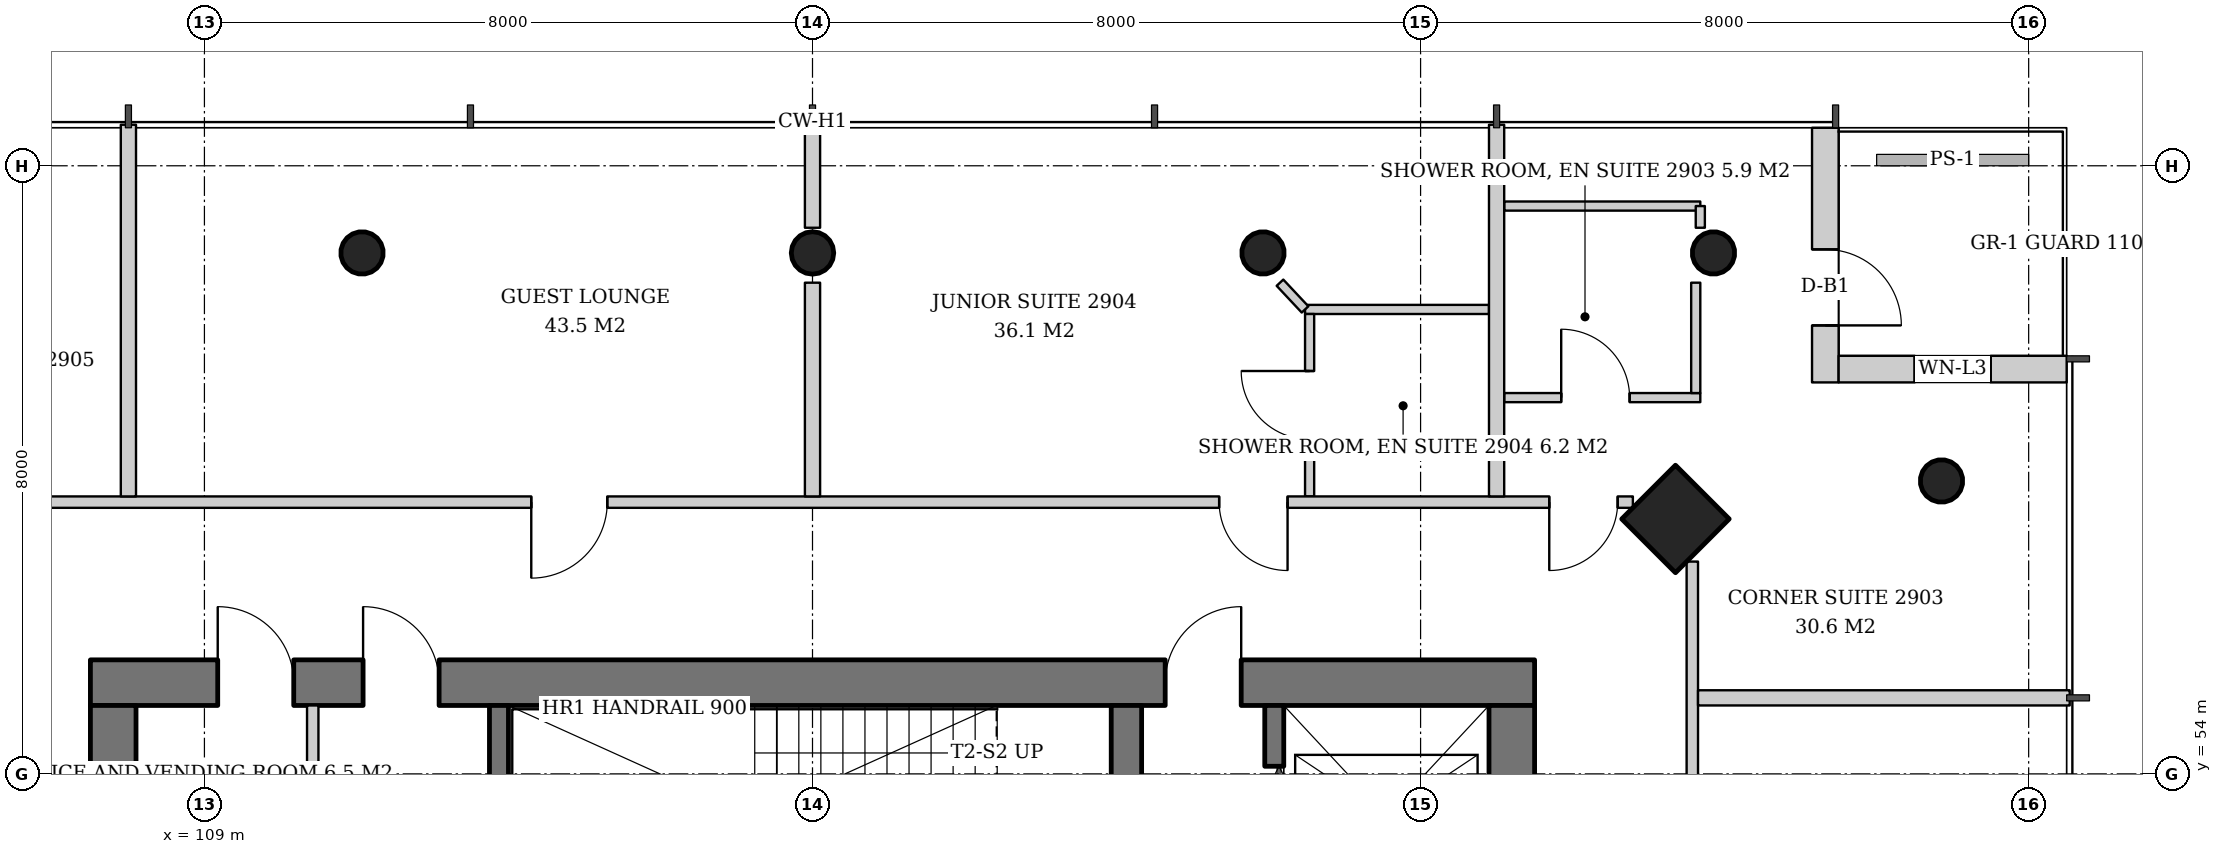
"""IFC4 building model, lengths in metres.
Left out: names, types, materials, properties, quantities, classifications, styles, units other than length and angle.
Written with IfcOpenShell. Run it as: python <this file> out.ifc"""

import sys

from ifc_helpers import new_model, si_unit, direction, frame, frame_2d, origin, origin_2d, place, context, subcontext, project, spatial, rectangle, hollow_circle, extrude, element, fill, save


model = new_model("IFC4")
c1 = context("Model", 3, precision=1e-05, world=origin(), true_north=direction((0.0, 1.0)))
c2 = subcontext(c1, "Body", "Model", "MODEL_VIEW")
j1 = project(units=[si_unit("LENGTHUNIT", "METRE"), si_unit("PLANEANGLEUNIT", "RADIAN")], contexts=[c1])
p1 = place(None, origin())
s1 = spatial("IfcSite", under=j1, at=p1, CompositionType="ELEMENT")
p2 = place(p1, origin())
s2 = spatial("IfcBuilding", under=s1, at=p2, CompositionType="ELEMENT")
p3 = place(p2, frame((0.0, 0.0, 116.0)))
s3 = spatial("IfcBuildingStorey", under=s2, at=p3, CompositionType="ELEMENT", Elevation=116.0)
p4 = place(p3, frame((128.405, 57.405, 0.0), z_axis=(-0.043029647111, -0.043029647111, 0.998146732169), x_axis=(0.707106781187, -0.707106781187, 0.0)))
e1 = element("IfcColumn", 1, at=p4, inside=s3, PredefinedType="COLUMN", context=c2, shape_type="SweptSolid", body=[
    extrude(rectangle(XDim=1.0, YDim=1.0, at=origin_2d()), origin(), (0.0, 0.0, 1.0), 3.807),
])
for number, where, z_axis, x_axis in (
    (2, (131.905, 57.905, 0.0), (-0.043, -0.043, 0.998), (0.707, -0.707, 0.0)),
    (3, (128.905, 60.905, 0.0), (-0.043, -0.043, 0.998), (0.707, -0.707, 0.0)),
):
    element("IfcColumn", number, at=place(p3, frame(where, z_axis=z_axis, x_axis=x_axis)), inside=s3, PredefinedType="COLUMN", context=c2, shape_type="SweptSolid", body=[
        extrude(hollow_circle(Radius=0.28, WallThickness=0.02, at=origin_2d()), origin(), (0.0, 0.0, 1.0), 3.807),
    ])
p5 = place(p3, frame((122.953, 60.905, 0.0), z_axis=(-0.021561848751, -0.043059525333, 0.998839808957), x_axis=(0.894160516368, -0.44774654769, 0.0)))
e4 = element("IfcColumn", 4, at=p5, inside=s3, PredefinedType="COLUMN", context=c2, shape_type="SweptSolid", body=[
    extrude(hollow_circle(Radius=0.28, WallThickness=0.02, at=origin_2d()), origin(), (0.0, 0.0, 1.0), 3.804),
])
p6 = place(p3, frame((117.0, 60.905, 0.0), z_axis=(0.0, -0.043069538298, 0.999072076915), x_axis=(1.0, 0.0, 0.0)))
e5 = element("IfcColumn", 5, at=p6, inside=s3, PredefinedType="COLUMN", context=c2, shape_type="SweptSolid", body=[
    extrude(hollow_circle(Radius=0.28, WallThickness=0.02, at=origin_2d()), origin(), (0.0, 0.0, 1.0), 3.803),
])
p7 = place(p3, frame((111.047, 60.905, 0.0), z_axis=(0.021561848751, -0.043059525333, 0.998839808957), x_axis=(0.894160516368, 0.44774654769, 0.0)))
e6 = element("IfcColumn", 6, at=p7, inside=s3, PredefinedType="COLUMN", context=c2, shape_type="SweptSolid", body=[
    extrude(hollow_circle(Radius=0.28, WallThickness=0.02, at=origin_2d()), origin(), (0.0, 0.0, 1.0), 3.804),
])
p8 = place(p3, frame((107.5, 55.2, 0.0), z_axis=(0.0, 0.0, 1.0), x_axis=(1.0, 0.0, 0.0)))
e7 = element("IfcWall", 7, at=p8, inside=s3, PredefinedType="SHEAR", context=c2, shape_type="SweptSolid", body=[
    extrude(rectangle(XDim=19.0, YDim=0.6, at=frame_2d((9.5, 0.0))), origin(), (0.0, 0.0, 1.0), 3.8),
])
p9 = place(p8, frame((14.14, 0.0, 0.0)))
e8 = element("IfcOpeningElement", 8, at=p9, cuts=e7, PredefinedType="OPENING", context=c2, shape_type="SweptSolid", body=[
    extrude(rectangle(XDim=1.0, YDim=2.1, at=frame_2d((0.5, 1.05))), frame((0.0, 0.31, 0.0), z_axis=(0.0, -1.0, 0.0), x_axis=(1.0, 0.0, 0.0)), (0.0, 0.0, 1.0), 0.62),
])
p10 = place(p8, frame((1.675, 0.0, 0.0)))
e9 = element("IfcOpeningElement", 9, at=p10, cuts=e7, PredefinedType="OPENING", context=c2, shape_type="SweptSolid", body=[
    extrude(rectangle(XDim=1.0, YDim=2.1, at=frame_2d((0.5, 1.05))), frame((0.0, 0.31, 0.0), z_axis=(0.0, -1.0, 0.0), x_axis=(1.0, 0.0, 0.0)), (0.0, 0.0, 1.0), 0.62),
])
p11 = place(p8, frame((3.587, 0.0, 0.0)))
e10 = element("IfcOpeningElement", 10, at=p11, cuts=e7, PredefinedType="OPENING", context=c2, shape_type="SweptSolid", body=[
    extrude(rectangle(XDim=1.0, YDim=2.1, at=frame_2d((0.5, 1.05))), frame((0.0, 0.31, 0.0), z_axis=(0.0, -1.0, 0.0), x_axis=(1.0, 0.0, 0.0)), (0.0, 0.0, 1.0), 0.62),
])
p12 = place(p3, frame((107.8, 37.1, 0.0), z_axis=(0.0, 0.0, 1.0), x_axis=(0.0, 1.0, 0.0)))
e11 = element("IfcWall", 11, at=p12, inside=s3, PredefinedType="SHEAR", context=c2, shape_type="SweptSolid", body=[
    extrude(rectangle(XDim=17.8, YDim=0.6, at=frame_2d((8.9, 0.0))), origin(), (0.0, 0.0, 1.0), 3.8),
])
p13 = place(p12, frame((8.0, 0.0, 0.0)))
e12 = element("IfcOpeningElement", 12, at=p13, cuts=e11, PredefinedType="OPENING", context=c2, shape_type="SweptSolid", body=[
    extrude(rectangle(XDim=1.8, YDim=2.4, at=frame_2d((0.9, 1.2))), frame((0.0, 0.31, 0.0), z_axis=(0.0, -1.0, 0.0), x_axis=(1.0, 0.0, 0.0)), (0.0, 0.0, 1.0), 0.62),
])
p14 = place(p3, frame((126.2, 37.1, 0.0), z_axis=(0.0, 0.0, 1.0), x_axis=(0.0, 1.0, 0.0)))
e13 = element("IfcWall", 13, at=p14, inside=s3, PredefinedType="SHEAR", context=c2, shape_type="SweptSolid", body=[
    extrude(rectangle(XDim=17.8, YDim=0.6, at=frame_2d((8.9, 0.0))), origin(), (0.0, 0.0, 1.0), 3.8),
])
p15 = place(p14, frame((8.0, 0.0, 0.0)))
e14 = element("IfcOpeningElement", 14, at=p15, cuts=e13, PredefinedType="OPENING", context=c2, shape_type="SweptSolid", body=[
    extrude(rectangle(XDim=1.8, YDim=2.4, at=frame_2d((0.9, 1.2))), frame((0.0, 0.31, 0.0), z_axis=(0.0, -1.0, 0.0), x_axis=(1.0, 0.0, 0.0)), (0.0, 0.0, 1.0), 0.62),
])
p16 = place(p3, frame((121.13, 52.0, 0.0), z_axis=(0.0, 0.0, 1.0), x_axis=(0.0, 1.0, 0.0)))
e15 = element("IfcWall", 15, at=p16, inside=s3, PredefinedType="SHEAR", context=c2, shape_type="SweptSolid", body=[
    extrude(rectangle(XDim=2.9, YDim=0.4, at=frame_2d((1.45, 0.0))), origin(), (0.0, 0.0, 1.0), 3.8),
])
p17 = place(p16, frame((0.3, 0.0, 0.0)))
e16 = element("IfcOpeningElement", 16, at=p17, cuts=e15, PredefinedType="OPENING", context=c2, shape_type="SweptSolid", body=[
    extrude(rectangle(XDim=1.0, YDim=2.1, at=frame_2d((0.5, 1.05))), frame((0.0, 0.21, 0.0), z_axis=(0.0, -1.0, 0.0), x_axis=(1.0, 0.0, 0.0)), (0.0, 0.0, 1.0), 0.42),
])
p18 = place(p3, frame((130.325, 62.5, 0.0), z_axis=(0.0, 0.0, 1.0), x_axis=(0.0, -1.0, 0.0)))
e17 = element("IfcWall", 17, at=p18, inside=s3, PredefinedType="SOLIDWALL", context=c2, shape_type="SweptSolid", body=[
    extrude(rectangle(XDim=3.35, YDim=0.35, at=frame_2d((1.675, 0.0))), origin(), (0.0, 0.0, 1.0), 3.6),
])
p19 = place(p18, frame((1.6, 0.0, 0.0)))
e18 = element("IfcOpeningElement", 18, at=p19, cuts=e17, PredefinedType="OPENING", context=c2, shape_type="SweptSolid", body=[
    extrude(rectangle(XDim=1.0, YDim=2.4, at=frame_2d((0.5, 1.2))), frame((0.0, 0.185, 0.0), z_axis=(0.0, -1.0, 0.0), x_axis=(1.0, 0.0, 0.0)), (0.0, 0.0, 1.0), 0.37),
])
p20 = place(p3, frame((130.5, 59.325, 0.0), z_axis=(0.0, 0.0, 1.0), x_axis=(1.0, 0.0, 0.0)))
e19 = element("IfcWall", 19, at=p20, inside=s3, PredefinedType="SOLIDWALL", context=c2, shape_type="SweptSolid", body=[
    extrude(rectangle(XDim=3.0, YDim=0.35, at=frame_2d((1.5, 0.0))), origin(), (0.0, 0.0, 1.0), 3.6),
])
p21 = place(p20, frame((1.0, 0.0, 0.9)))
e20 = element("IfcOpeningElement", 20, at=p21, cuts=e19, PredefinedType="OPENING", context=c2, shape_type="SweptSolid", body=[
    extrude(rectangle(XDim=1.0, YDim=2.4, at=frame_2d((0.5, 1.2))), frame((0.0, 0.185, 0.0), z_axis=(0.0, -1.0, 0.0), x_axis=(1.0, 0.0, 0.0)), (0.0, 0.0, 1.0), 0.37),
])
p22 = place(p3, frame((112.875, 52.0, 0.0), z_axis=(0.0, 0.0, 1.0), x_axis=(0.0, 1.0, 0.0)))
e21 = element("IfcWall", 21, at=p22, inside=s3, PredefinedType="SHEAR", context=c2, shape_type="SweptSolid", body=[
    extrude(rectangle(XDim=2.9, YDim=0.25, at=frame_2d((1.45, 0.0))), origin(), (0.0, 0.0, 1.0), 3.8),
])
p23 = place(p3, frame((123.075, 52.0, 0.0), z_axis=(0.0, 0.0, 1.0), x_axis=(0.0, 1.0, 0.0)))
e22 = element("IfcWall", 22, at=p23, inside=s3, PredefinedType="SHEAR", context=c2, shape_type="SweptSolid", body=[
    extrude(rectangle(XDim=2.9, YDim=0.25, at=frame_2d((1.45, 0.0))), origin(), (0.0, 0.0, 1.0), 3.8),
])
p24 = place(p23, frame((0.8, 0.0, 0.0)))
e23 = element("IfcOpeningElement", 23, at=p24, cuts=e22, PredefinedType="OPENING", context=c2, shape_type="SweptSolid", body=[
    extrude(rectangle(XDim=1.3, YDim=2.2, at=frame_2d((0.65, 1.1))), frame((0.0, 0.135, 0.0), z_axis=(0.0, -1.0, 0.0), x_axis=(1.0, 0.0, 0.0)), (0.0, 0.0, 1.0), 0.27),
])
p25 = place(p3, frame((110.425, 52.0, 0.0), z_axis=(0.0, 0.0, 1.0), x_axis=(0.0, 1.0, 0.0)))
e24 = element("IfcWall", 24, at=p25, inside=s3, PredefinedType="SOLIDWALL", context=c2, shape_type="SweptSolid", body=[
    extrude(rectangle(XDim=2.9, YDim=0.15, at=frame_2d((1.45, 0.0))), origin(), (0.0, 0.0, 1.0), 3.6),
])
p26 = place(p3, frame((128.575, 35.207, 0.0), z_axis=(0.0, 0.0, 1.0), x_axis=(0.0, 1.0, 0.0)))
e25 = element("IfcWall", 25, at=p26, inside=s3, PredefinedType="PARTITIONING", context=c2, shape_type="SweptSolid", body=[
    extrude(rectangle(XDim=21.586, YDim=0.15, at=frame_2d((10.793, 0.0))), origin(), (0.0, 0.0, 1.0), 2.9),
])
p27 = place(p26, frame((0.2, 0.0, 0.0)))
e26 = element("IfcOpeningElement", 26, at=p27, cuts=e25, PredefinedType="OPENING", context=c2, shape_type="SweptSolid", body=[
    extrude(rectangle(XDim=0.9, YDim=2.1, at=frame_2d((0.45, 1.05))), frame((0.0, 0.085, 0.0), z_axis=(0.0, -1.0, 0.0), x_axis=(1.0, 0.0, 0.0)), (0.0, 0.0, 1.0), 0.17),
])
p28 = place(p26, frame((4.493, 0.0, 0.0)))
e27 = element("IfcOpeningElement", 27, at=p28, cuts=e25, PredefinedType="OPENING", context=c2, shape_type="SweptSolid", body=[
    extrude(rectangle(XDim=1.0, YDim=2.1, at=frame_2d((0.5, 1.05))), frame((0.0, 0.085, 0.0), z_axis=(0.0, -1.0, 0.0), x_axis=(1.0, 0.0, 0.0)), (0.0, 0.0, 1.0), 0.17),
])
p29 = place(p26, frame((13.543, 0.0, 0.0)))
e28 = element("IfcOpeningElement", 28, at=p29, cuts=e25, PredefinedType="OPENING", context=c2, shape_type="SweptSolid", body=[
    extrude(rectangle(XDim=0.9, YDim=2.1, at=frame_2d((0.45, 1.05))), frame((0.0, 0.085, 0.0), z_axis=(0.0, -1.0, 0.0), x_axis=(1.0, 0.0, 0.0)), (0.0, 0.0, 1.0), 0.17),
])
p30 = place(p3, frame((128.65, 55.0, 0.0), z_axis=(0.0, 0.0, 1.0), x_axis=(1.0, 0.0, 0.0)))
e29 = element("IfcWall", 29, at=p30, inside=s3, PredefinedType="PARTITIONING", context=c2, shape_type="SweptSolid", body=[
    extrude(rectangle(XDim=4.89, YDim=0.2, at=frame_2d((2.445, 0.0))), origin(), (0.0, 0.0, 1.0), 3.2),
])
p31 = place(p3, frame((126.1, 58.95, 0.0), z_axis=(0.0, 0.0, 1.0), x_axis=(1.0, 0.0, 0.0)))
e30 = element("IfcWall", 30, at=p31, inside=s3, PredefinedType="PARTITIONING", context=c2, shape_type="SweptSolid", body=[
    extrude(rectangle(XDim=2.58, YDim=0.12, at=frame_2d((1.29, 0.0))), origin(), (0.0, 0.0, 1.0), 2.9),
])
p32 = place(p31, frame((0.75, 0.0, 0.0)))
e31 = element("IfcOpeningElement", 31, at=p32, cuts=e30, PredefinedType="OPENING", context=c2, shape_type="SweptSolid", body=[
    extrude(rectangle(XDim=0.9, YDim=2.1, at=frame_2d((0.45, 1.05))), frame((0.0, 0.07, 0.0), z_axis=(0.0, -1.0, 0.0), x_axis=(1.0, 0.0, 0.0)), (0.0, 0.0, 1.0), 0.14),
])
p33 = place(p3, frame((126.1, 61.47, 0.0), z_axis=(0.0, 0.0, 1.0), x_axis=(1.0, 0.0, 0.0)))
e32 = element("IfcWall", 32, at=p33, inside=s3, PredefinedType="PARTITIONING", context=c2, shape_type="SweptSolid", body=[
    extrude(rectangle(XDim=2.58, YDim=0.12, at=frame_2d((1.29, 0.0))), origin(), (0.0, 0.0, 1.0), 3.6),
])
p34 = place(p3, frame((128.62, 59.01, 0.0), z_axis=(0.0, 0.0, 1.0), x_axis=(0.0, 1.0, 0.0)))
e33 = element("IfcWall", 33, at=p34, inside=s3, PredefinedType="PARTITIONING", context=c2, shape_type="SweptSolid", body=[
    extrude(rectangle(XDim=1.452, YDim=0.12, at=frame_2d((0.726, 0.0))), origin(), (0.0, 0.0, 1.0), 3.2),
])
p35 = place(p3, frame((125.9, 60.11, 0.0), z_axis=(0.0, 0.0, 1.0), x_axis=(-1.0, 0.0, 0.0)))
e34 = element("IfcWall", 34, at=p35, inside=s3, PredefinedType="PARTITIONING", context=c2, shape_type="SweptSolid", body=[
    extrude(rectangle(XDim=2.42, YDim=0.12, at=frame_2d((1.21, 0.0))), origin(), (0.0, 0.0, 1.0), 3.6),
])
p36 = place(p3, frame((123.54, 57.65, 0.0), z_axis=(0.0, 0.0, 1.0), x_axis=(0.0, 1.0, 0.0)))
e35 = element("IfcWall", 35, at=p36, inside=s3, PredefinedType="PARTITIONING", context=c2, shape_type="SweptSolid", body=[
    extrude(rectangle(XDim=2.4, YDim=0.12, at=frame_2d((1.2, 0.0))), origin(), (0.0, 0.0, 1.0), 3.6),
])
p37 = place(p36, frame((0.75, 0.0, 0.0)))
e36 = element("IfcOpeningElement", 36, at=p37, cuts=e35, PredefinedType="OPENING", context=c2, shape_type="SweptSolid", body=[
    extrude(rectangle(XDim=0.9, YDim=2.1, at=frame_2d((0.45, 1.05))), frame((0.0, 0.07, 0.0), z_axis=(0.0, -1.0, 0.0), x_axis=(1.0, 0.0, 0.0)), (0.0, 0.0, 1.0), 0.14),
])
p38 = place(p3, frame((127.793, 57.575, 0.0), z_axis=(0.0, 0.0, 1.0), x_axis=(-1.0, 0.0, 0.0)))
e37 = element("IfcWall", 37, at=p38, inside=s3, PredefinedType="PARTITIONING", context=c2, shape_type="SweptSolid", body=[
    extrude(rectangle(XDim=21.586, YDim=0.15, at=frame_2d((10.793, 0.0))), origin(), (0.0, 0.0, 1.0), 2.9),
])
p39 = place(p38, frame((0.2, 0.0, 0.0)))
e38 = element("IfcOpeningElement", 38, at=p39, cuts=e37, PredefinedType="OPENING", context=c2, shape_type="SweptSolid", body=[
    extrude(rectangle(XDim=0.9, YDim=2.1, at=frame_2d((0.45, 1.05))), frame((0.0, 0.085, 0.0), z_axis=(0.0, -1.0, 0.0), x_axis=(1.0, 0.0, 0.0)), (0.0, 0.0, 1.0), 0.17),
])
p40 = place(p38, frame((4.543, 0.0, 0.0)))
e39 = element("IfcOpeningElement", 39, at=p40, cuts=e37, PredefinedType="OPENING", context=c2, shape_type="SweptSolid", body=[
    extrude(rectangle(XDim=0.9, YDim=2.1, at=frame_2d((0.45, 1.05))), frame((0.0, 0.085, 0.0), z_axis=(0.0, -1.0, 0.0), x_axis=(1.0, 0.0, 0.0)), (0.0, 0.0, 1.0), 0.17),
])
p41 = place(p38, frame((13.493, 0.0, 0.0)))
e40 = element("IfcOpeningElement", 40, at=p41, cuts=e37, PredefinedType="OPENING", context=c2, shape_type="SweptSolid", body=[
    extrude(rectangle(XDim=1.0, YDim=2.1, at=frame_2d((0.5, 1.05))), frame((0.0, 0.085, 0.0), z_axis=(0.0, -1.0, 0.0), x_axis=(1.0, 0.0, 0.0)), (0.0, 0.0, 1.0), 0.17),
])
p42 = place(p3, frame((126.0, 57.65, 0.0), z_axis=(0.0, 0.0, 1.0), x_axis=(0.0, 1.0, 0.0)))
e41 = element("IfcWall", 41, at=p42, inside=s3, PredefinedType="PARTITIONING", context=c2, shape_type="SweptSolid", body=[
    extrude(rectangle(XDim=4.89, YDim=0.2, at=frame_2d((2.445, 0.0))), origin(), (0.0, 0.0, 1.0), 2.9),
])
p43 = place(p3, frame((117.0, 57.65, 0.0), z_axis=(0.0, 0.0, 1.0), x_axis=(0.0, 1.0, 0.0)))
e42 = element("IfcWall", 42, at=p43, inside=s3, PredefinedType="PARTITIONING", context=c2, shape_type="SweptSolid", body=[
    extrude(rectangle(XDim=2.812, YDim=0.2, at=frame_2d((1.406, 0.0))), origin(), (0.0, 0.0, 1.0), 3.6),
])
p44 = place(p3, frame((117.0, 61.185, 0.0), z_axis=(0.0, 0.0, 1.0), x_axis=(0.0, 1.0, 0.0)))
e43 = element("IfcWall", 43, at=p44, inside=s3, PredefinedType="PARTITIONING", context=c2, shape_type="SweptSolid", body=[
    extrude(rectangle(XDim=1.355, YDim=0.2, at=frame_2d((0.678, 0.0))), origin(), (0.0, 0.0, 1.0), 3.6),
])
p45 = place(p3, frame((108.0, 57.65, 0.0), z_axis=(0.0, 0.0, 1.0), x_axis=(0.0, 1.0, 0.0)))
e44 = element("IfcWall", 44, at=p45, inside=s3, PredefinedType="PARTITIONING", context=c2, shape_type="SweptSolid", body=[
    extrude(rectangle(XDim=4.89, YDim=0.2, at=frame_2d((2.445, 0.0))), origin(), (0.0, 0.0, 1.0), 3.2),
])
p46 = place(p3, frame((128.68, 61.47, 0.0), z_axis=(0.0, 0.0, 1.0), x_axis=(0.0, -1.0, 0.0)))
e45 = element("IfcWall", 45, at=p46, inside=s3, PredefinedType="PARTITIONING", context=c2, shape_type="SweptSolid", body=[
    extrude(rectangle(XDim=0.285, YDim=0.12, at=frame_2d((0.143, 0.0))), origin(), (0.0, 0.0, 1.0), 3.6),
])
p47 = place(p3, frame((123.48, 60.11, 0.0), z_axis=(0.0, 0.0, 1.0), x_axis=(-0.683957968966, 0.729521416195, 0.0)))
e46 = element("IfcWall", 46, at=p47, inside=s3, PredefinedType="PARTITIONING", context=c2, shape_type="SweptSolid", body=[
    extrude(rectangle(XDim=0.482, YDim=0.12, at=frame_2d((0.241, 0.0))), origin(), (0.0, 0.0, 1.0), 3.6),
])
p48 = place(p19, origin())
e47 = element("IfcDoor", 47, at=p48, inside=s3, OperationType="SINGLE_SWING_RIGHT", PredefinedType="DOOR", context=c2, shape_type="SweptSolid", body=[
    extrude(rectangle(XDim=1.0, YDim=2.4, at=frame_2d((0.5, 1.2))), frame((0.0, 0.025, 0.0), z_axis=(0.0, -1.0, 0.0), x_axis=(1.0, 0.0, 0.0)), (0.0, 0.0, 1.0), 0.05),
])
fill(e18, e47)
p49 = place(p21, origin())
e48 = element("IfcWindow", 48, at=p49, inside=s3, PartitioningType="SINGLE_PANEL", PredefinedType="WINDOW", context=c2, shape_type="SweptSolid", body=[
    extrude(rectangle(XDim=1.0, YDim=2.4, at=frame_2d((0.5, 1.2))), frame((0.0, 0.03, 0.0), z_axis=(0.0, -1.0, 0.0), x_axis=(1.0, 0.0, 0.0)), (0.0, 0.0, 1.0), 0.06),
])
fill(e20, e48)
p50 = place(p24, origin())
e49 = element("IfcDoor", 49, at=p50, inside=s3, OperationType="DOUBLE_DOOR_SLIDING", PredefinedType="DOOR", context=c2, shape_type="SweptSolid", body=[
    extrude(rectangle(XDim=1.3, YDim=2.2, at=frame_2d((0.65, 1.1))), frame((0.0, 0.025, 0.0), z_axis=(0.0, -1.0, 0.0), x_axis=(1.0, 0.0, 0.0)), (0.0, 0.0, 1.0), 0.05),
])
fill(e23, e49)
p51 = place(p9, origin())
e50 = element("IfcDoor", 50, at=p51, inside=s3, OperationType="SINGLE_SWING_RIGHT", PredefinedType="DOOR", context=c2, shape_type="SweptSolid", body=[
    extrude(rectangle(XDim=1.0, YDim=2.1, at=frame_2d((0.5, 1.05))), frame((0.0, 0.025, 0.0), z_axis=(0.0, -1.0, 0.0), x_axis=(1.0, 0.0, 0.0)), (0.0, 0.0, 1.0), 0.05),
])
fill(e8, e50)
p52 = place(p10, origin())
e51 = element("IfcDoor", 51, at=p52, inside=s3, OperationType="SINGLE_SWING_LEFT", PredefinedType="DOOR", context=c2, shape_type="SweptSolid", body=[
    extrude(rectangle(XDim=1.0, YDim=2.1, at=frame_2d((0.5, 1.05))), frame((0.0, -0.24, 0.0), z_axis=(0.0, -1.0, 0.0), x_axis=(1.0, 0.0, 0.0)), (0.0, 0.0, 1.0), 0.05),
])
fill(e9, e51)
p53 = place(p11, origin())
e52 = element("IfcDoor", 52, at=p53, inside=s3, OperationType="SINGLE_SWING_LEFT", PredefinedType="DOOR", context=c2, shape_type="SweptSolid", body=[
    extrude(rectangle(XDim=1.0, YDim=2.1, at=frame_2d((0.5, 1.05))), frame((0.0, -0.24, 0.0), z_axis=(0.0, -1.0, 0.0), x_axis=(1.0, 0.0, 0.0)), (0.0, 0.0, 1.0), 0.05),
])
fill(e10, e52)
p54 = place(p32, origin())
e53 = element("IfcDoor", 53, at=p54, inside=s3, OperationType="SINGLE_SWING_LEFT", PredefinedType="DOOR", context=c2, shape_type="SweptSolid", body=[
    extrude(rectangle(XDim=0.9, YDim=2.1, at=frame_2d((0.45, 1.05))), frame((0.0, 0.025, 0.0), z_axis=(0.0, -1.0, 0.0), x_axis=(1.0, 0.0, 0.0)), (0.0, 0.0, 1.0), 0.05),
])
fill(e31, e53)
p55 = place(p37, origin())
e54 = element("IfcDoor", 54, at=p55, inside=s3, OperationType="SINGLE_SWING_RIGHT", PredefinedType="DOOR", context=c2, shape_type="SweptSolid", body=[
    extrude(rectangle(XDim=0.9, YDim=2.1, at=frame_2d((0.45, 1.05))), frame((0.0, 0.025, 0.0), z_axis=(0.0, -1.0, 0.0), x_axis=(1.0, 0.0, 0.0)), (0.0, 0.0, 1.0), 0.05),
])
fill(e36, e54)
p56 = place(p39, origin())
e55 = element("IfcDoor", 55, at=p56, inside=s3, OperationType="SINGLE_SWING_RIGHT", PredefinedType="DOOR", context=c2, shape_type="SweptSolid", body=[
    extrude(rectangle(XDim=0.9, YDim=2.1, at=frame_2d((0.45, 1.05))), frame((0.0, 0.025, 0.0), z_axis=(0.0, -1.0, 0.0), x_axis=(1.0, 0.0, 0.0)), (0.0, 0.0, 1.0), 0.05),
])
fill(e38, e55)
p57 = place(p40, origin())
e56 = element("IfcDoor", 56, at=p57, inside=s3, OperationType="SINGLE_SWING_LEFT", PredefinedType="DOOR", context=c2, shape_type="SweptSolid", body=[
    extrude(rectangle(XDim=0.9, YDim=2.1, at=frame_2d((0.45, 1.05))), frame((0.0, 0.025, 0.0), z_axis=(0.0, -1.0, 0.0), x_axis=(1.0, 0.0, 0.0)), (0.0, 0.0, 1.0), 0.05),
])
fill(e39, e56)
p58 = place(p41, origin())
e57 = element("IfcDoor", 57, at=p58, inside=s3, OperationType="SINGLE_SWING_RIGHT", PredefinedType="DOOR", context=c2, shape_type="SweptSolid", body=[
    extrude(rectangle(XDim=1.0, YDim=2.1, at=frame_2d((0.5, 1.05))), frame((0.0, 0.025, 0.0), z_axis=(0.0, -1.0, 0.0), x_axis=(1.0, 0.0, 0.0)), (0.0, 0.0, 1.0), 0.05),
])
fill(e40, e57)
save(model, sys.argv[1])
